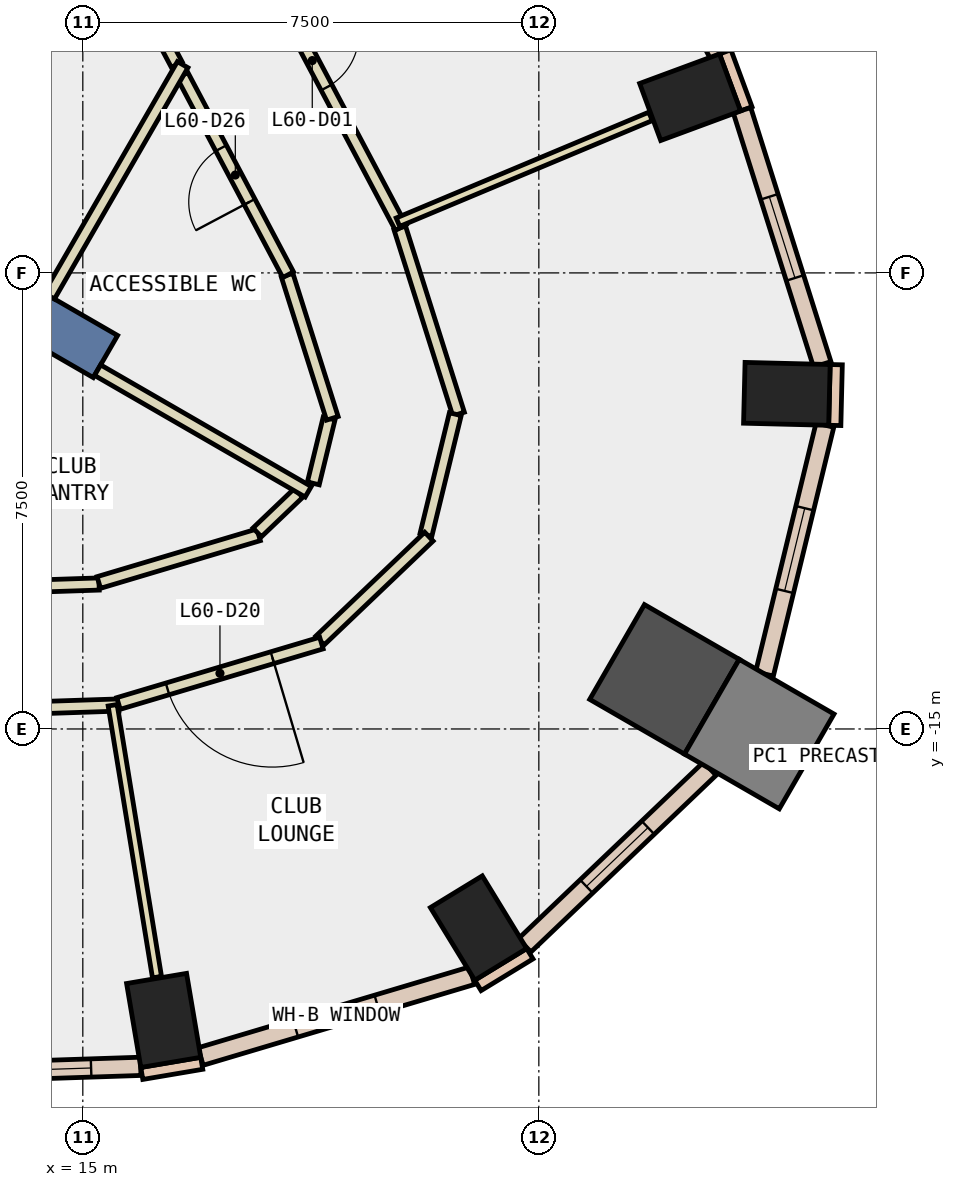
"""IFC4 building model, lengths in metres.
Left out: names, types, materials, properties, quantities, classifications, styles, units other than length and angle.
Written with IfcOpenShell. Run it as: python <this file> out.ifc"""

import sys

from ifc_helpers import new_model, si_unit, direction, frame, frame_2d, origin, origin_2d, place, context, subcontext, project, spatial, rectangle, extrude, element, fill, save


model = new_model("IFC4")
c1 = context("Model", 3, precision=1e-05, world=origin(), true_north=direction((0.0, 1.0)))
c2 = subcontext(c1, "Body", "Model", "MODEL_VIEW")
j1 = project(units=[si_unit("LENGTHUNIT", "METRE"), si_unit("PLANEANGLEUNIT", "RADIAN")], contexts=[c1])
p1 = place(None, origin())
s1 = spatial("IfcSite", under=j1, at=p1, CompositionType="ELEMENT")
p2 = place(p1, origin())
s2 = spatial("IfcBuilding", under=s1, at=p2, CompositionType="ELEMENT")
p3 = place(p2, frame((0.0, 0.0, 263.0)))
s3 = spatial("IfcBuildingStorey", under=s2, at=p3, CompositionType="ELEMENT", Elevation=263.0)
for number, where, z_axis, x_axis in (
    (1, (16.33, -19.793, -0.34), (0.0, 0.0, 1.0), (0.986, 0.167, 0.0)),
    (2, (21.508, -18.274, -0.34), (0.0, 0.0, 1.0), (0.853, 0.521, 0.0)),
):
    element("IfcColumn", number, at=place(p3, frame(where, z_axis=z_axis, x_axis=x_axis)), inside=s3, PredefinedType="COLUMN", context=c2, shape_type="SweptSolid", body=[
        extrude(rectangle(XDim=1.0, YDim=1.4, at=origin_2d()), origin(), (0.0, 0.0, 1.0), 3.6),
    ])
p4 = place(p3, frame((24.566, -14.184, -0.34), z_axis=(0.0, 0.0, 1.0), x_axis=(-0.866025403784, 0.5, 0.0)))
e3 = element("IfcColumn", 3, at=p4, inside=s3, PredefinedType="COLUMN", context=c2, shape_type="SweptSolid", body=[
    extrude(rectangle(XDim=1.8, YDim=1.8, at=origin_2d()), origin(), (0.0, 0.0, 1.0), 3.6),
])
for number, where, z_axis, x_axis in (
    (4, (26.579, -9.489, -0.34), (0.0, 0.0, 1.0), (0.025, 1.0, 0.0)),
    (5, (24.988, -4.611, -0.34), (0.0, 0.0, 1.0), (-0.347, 0.938, 0.0)),
):
    element("IfcColumn", number, at=place(p3, frame(where, z_axis=z_axis, x_axis=x_axis)), inside=s3, PredefinedType="COLUMN", context=c2, shape_type="SweptSolid", body=[
        extrude(rectangle(XDim=1.0, YDim=1.4, at=origin_2d()), origin(), (0.0, 0.0, 1.0), 3.6),
    ])
p5 = place(p3, frame((26.125, -15.084, -0.34), z_axis=(0.0, 0.0, 1.0), x_axis=(-0.866025403784, 0.5, 0.0)))
e6 = element("IfcColumn", 6, at=p5, inside=s3, PredefinedType="COLUMN", context=c2, shape_type="SweptSolid", body=[
    extrude(rectangle(XDim=1.8, YDim=1.8, at=origin_2d()), origin(), (0.0, 0.0, 1.0), 3.6),
])
p6 = place(p3, frame((7.578, -4.375, -0.34), z_axis=(0.0, 0.0, 1.0), x_axis=(0.866024315419, -0.5000018851, 0.0)))
e7 = element("IfcWall", 7, at=p6, inside=s3, PredefinedType="SHEAR", context=c2, shape_type="SweptSolid", body=[
    extrude(rectangle(XDim=9.0, YDim=0.8, at=frame_2d((4.5, 0.0))), origin(), (0.0, 0.0, 1.0), 3.6),
])
for number, where, z_axis, x_axis in (
    (8, (25.912, -4.803, 0.0), (0.0, 0.0, 1.0), (-0.347, 0.938, 0.0)),
    (9, (15.97, -20.665, 0.0), (0.0, 0.0, 1.0), (0.986, 0.167, 0.0)),
):
    element("IfcWall", number, at=place(p3, frame(where, z_axis=z_axis, x_axis=x_axis)), inside=s3, PredefinedType="STANDARD", context=c2, shape_type="SweptSolid", body=[
        extrude(rectangle(XDim=1.0, YDim=0.2, at=frame_2d((0.5, 0.0))), origin(), (0.0, 0.0, 1.0), 3.26),
    ])
p7 = place(p3, frame((21.498, -19.217, 0.0), z_axis=(0.0, 0.0, 1.0), x_axis=(0.853679739553, 0.520798331677, 0.0)))
e10 = element("IfcWall", 10, at=p7, inside=s3, PredefinedType="STANDARD", context=c2, shape_type="SweptSolid", body=[
    extrude(rectangle(XDim=1.0, YDim=0.2, at=frame_2d((0.5, 0.0))), origin(), (0.0, 0.0, 1.0), 3.26),
])
p8 = place(p3, frame((27.367, -10.008, 0.0), z_axis=(0.0, 0.0, 1.0), x_axis=(0.024186470916, 0.999707464524, 0.0)))
e11 = element("IfcWall", 11, at=p8, inside=s3, PredefinedType="STANDARD", context=c2, shape_type="SweptSolid", body=[
    extrude(rectangle(XDim=0.999, YDim=0.2, at=frame_2d((0.5, 0.0))), origin(), (0.0, 0.0, 1.0), 3.26),
])
p9 = place(p3, frame((8.296, -20.802, 0.0), z_axis=(0.0, 0.0, 1.0), x_axis=(0.999450376985, 0.033150323459, 0.0)))
e12 = element("IfcWall", 12, at=p9, inside=s3, PredefinedType="STANDARD", context=c2, shape_type="SweptSolid", body=[
    extrude(rectangle(XDim=7.659, YDim=0.3, at=frame_2d((3.83, 0.0))), origin(), (0.0, 0.0, 1.0), 3.26),
])
p10 = place(p9, frame((0.815, 0.0, 0.9)))
e13 = element("IfcOpeningElement", 13, at=p10, cuts=e12, PredefinedType="OPENING", context=c2, shape_type="SweptSolid", body=[
    extrude(rectangle(XDim=2.2, YDim=2.0, at=frame_2d((1.1, 1.0))), frame((0.0, 0.16, 0.0), z_axis=(0.0, -1.0, 0.0), x_axis=(1.0, 0.0, 0.0)), (0.0, 0.0, 1.0), 0.32),
])
p11 = place(p9, frame((4.644, 0.0, 0.9)))
e14 = element("IfcOpeningElement", 14, at=p11, cuts=e12, PredefinedType="OPENING", context=c2, shape_type="SweptSolid", body=[
    extrude(rectangle(XDim=2.2, YDim=2.0, at=frame_2d((1.1, 1.0))), frame((0.0, 0.16, 0.0), z_axis=(0.0, -1.0, 0.0), x_axis=(1.0, 0.0, 0.0)), (0.0, 0.0, 1.0), 0.32),
])
p12 = place(p3, frame((16.937, -20.387, 0.0), z_axis=(0.0, 0.0, 1.0), x_axis=(0.958361270465, 0.285558532131, 0.0)))
e15 = element("IfcWall", 15, at=p12, inside=s3, PredefinedType="STANDARD", context=c2, shape_type="SweptSolid", body=[
    extrude(rectangle(XDim=4.658, YDim=0.3, at=frame_2d((2.329, 0.0))), origin(), (0.0, 0.0, 1.0), 3.26),
])
p13 = place(p12, frame((1.629, 0.0, 0.9)))
e16 = element("IfcOpeningElement", 16, at=p13, cuts=e15, PredefinedType="OPENING", context=c2, shape_type="SweptSolid", body=[
    extrude(rectangle(XDim=1.4, YDim=2.0, at=frame_2d((0.7, 1.0))), frame((0.0, 0.16, 0.0), z_axis=(0.0, -1.0, 0.0), x_axis=(1.0, 0.0, 0.0)), (0.0, 0.0, 1.0), 0.32),
])
p14 = place(p3, frame((22.266, -18.559, 0.0), z_axis=(0.0, 0.0, 1.0), x_axis=(0.723526681061, 0.690296415892, 0.0)))
e17 = element("IfcWall", 17, at=p14, inside=s3, PredefinedType="STANDARD", context=c2, shape_type="SweptSolid", body=[
    extrude(rectangle(XDim=4.21, YDim=0.3, at=frame_2d((2.105, 0.0))), origin(), (0.0, 0.0, 1.0), 3.26),
])
p15 = place(p14, frame((1.405, 0.0, 0.9)))
e18 = element("IfcOpeningElement", 18, at=p15, cuts=e17, PredefinedType="OPENING", context=c2, shape_type="SweptSolid", body=[
    extrude(rectangle(XDim=1.4, YDim=2.0, at=frame_2d((0.7, 1.0))), frame((0.0, 0.16, 0.0), z_axis=(0.0, -1.0, 0.0), x_axis=(1.0, 0.0, 0.0)), (0.0, 0.0, 1.0), 0.32),
])
p16 = place(p3, frame((26.211, -14.095, 0.0), z_axis=(0.0, 0.0, 1.0), x_axis=(0.236077883519, 0.97173413695, 0.0)))
e19 = element("IfcWall", 19, at=p16, inside=s3, PredefinedType="STANDARD", context=c2, shape_type="SweptSolid", body=[
    extrude(rectangle(XDim=4.211, YDim=0.3, at=frame_2d((2.105, 0.0))), origin(), (0.0, 0.0, 1.0), 3.26),
])
p17 = place(p16, frame((1.405, 0.0, 0.9)))
e20 = element("IfcOpeningElement", 20, at=p17, cuts=e19, PredefinedType="OPENING", context=c2, shape_type="SweptSolid", body=[
    extrude(rectangle(XDim=1.4, YDim=2.0, at=frame_2d((0.7, 1.0))), frame((0.0, 0.16, 0.0), z_axis=(0.0, -1.0, 0.0), x_axis=(1.0, 0.0, 0.0)), (0.0, 0.0, 1.0), 0.32),
])
p18 = place(p3, frame((27.161, -9.004, 0.0), z_axis=(0.0, 0.0, 1.0), x_axis=(-0.30108868778, 0.953596142028, 0.0)))
e21 = element("IfcWall", 21, at=p18, inside=s3, PredefinedType="STANDARD", context=c2, shape_type="SweptSolid", body=[
    extrude(rectangle(XDim=4.38, YDim=0.3, at=frame_2d((2.19, 0.0))), origin(), (0.0, 0.0, 1.0), 3.26),
])
p19 = place(p18, frame((1.49, 0.0, 0.9)))
e22 = element("IfcOpeningElement", 22, at=p19, cuts=e21, PredefinedType="OPENING", context=c2, shape_type="SweptSolid", body=[
    extrude(rectangle(XDim=1.4, YDim=2.0, at=frame_2d((0.7, 1.0))), frame((0.0, 0.16, 0.0), z_axis=(0.0, -1.0, 0.0), x_axis=(1.0, 0.0, 0.0)), (0.0, 0.0, 1.0), 0.32),
])
p20 = place(p3, frame((25.454, -3.907, 0.0), z_axis=(0.0, 0.0, 1.0), x_axis=(-0.468220106253, 0.883611867338, 0.0)))
e23 = element("IfcWall", 23, at=p20, inside=s3, PredefinedType="STANDARD", context=c2, shape_type="SweptSolid", body=[
    extrude(rectangle(XDim=5.703, YDim=0.3, at=frame_2d((2.852, 0.0))), origin(), (0.0, 0.0, 1.0), 3.26),
])
p21 = place(p20, frame((0.476, 0.0, 0.9)))
e24 = element("IfcOpeningElement", 24, at=p21, cuts=e23, PredefinedType="OPENING", context=c2, shape_type="SweptSolid", body=[
    extrude(rectangle(XDim=1.9, YDim=2.0, at=frame_2d((0.95, 1.0))), frame((0.0, 0.16, 0.0), z_axis=(0.0, -1.0, 0.0), x_axis=(1.0, 0.0, 0.0)), (0.0, 0.0, 1.0), 0.32),
])
p22 = place(p20, frame((3.327, 0.0, 0.9)))
e25 = element("IfcOpeningElement", 25, at=p22, cuts=e23, PredefinedType="OPENING", context=c2, shape_type="SweptSolid", body=[
    extrude(rectangle(XDim=1.9, YDim=2.0, at=frame_2d((0.95, 1.0))), frame((0.0, 0.16, 0.0), z_axis=(0.0, -1.0, 0.0), x_axis=(1.0, 0.0, 0.0)), (0.0, 0.0, 1.0), 0.32),
])
p23 = place(p3, frame((16.545, -4.074, 0.0), z_axis=(0.0, 0.0, 1.0), x_axis=(-0.468321873419, 0.883557934081, 0.0)))
e26 = element("IfcWall", 26, at=p23, inside=s3, PredefinedType="PARTITIONING", context=c2, shape_type="SweptSolid", body=[
    extrude(rectangle(XDim=2.093, YDim=0.2, at=frame_2d((1.046, 0.0))), origin(), (0.0, 0.0, 1.0), 3.26),
])
p24 = place(p3, frame((11.716, -12.734, 0.0), z_axis=(0.0, 0.0, 1.0), x_axis=(0.999449093602, 0.03318899362, 0.0)))
e27 = element("IfcWall", 27, at=p24, inside=s3, PredefinedType="PARTITIONING", context=c2, shape_type="SweptSolid", body=[
    extrude(rectangle(XDim=3.553, YDim=0.2, at=frame_2d((1.776, 0.0))), origin(), (0.0, 0.0, 1.0), 3.26),
])
p25 = place(p24, frame((1.276, 0.0, 0.0)))
e28 = element("IfcOpeningElement", 28, at=p25, cuts=e27, PredefinedType="OPENING", context=c2, shape_type="SweptSolid", body=[
    extrude(rectangle(XDim=1.0, YDim=2.1, at=frame_2d((0.5, 1.05))), frame((0.0, 0.11, 0.0), z_axis=(0.0, -1.0, 0.0), x_axis=(1.0, 0.0, 0.0)), (0.0, 0.0, 1.0), 0.22),
])
p26 = place(p3, frame((15.263, -12.591, 0.0), z_axis=(0.0, 0.0, 1.0), x_axis=(0.958253964342, 0.285918414628, 0.0)))
e29 = element("IfcWall", 29, at=p26, inside=s3, PredefinedType="PARTITIONING", context=c2, shape_type="SweptSolid", body=[
    extrude(rectangle(XDim=2.743, YDim=0.2, at=frame_2d((1.371, 0.0))), origin(), (0.0, 0.0, 1.0), 3.26),
])
p27 = place(p3, frame((17.868, -11.767, 0.0), z_axis=(0.0, 0.0, 1.0), x_axis=(0.723402701671, 0.690426340181, 0.0)))
e30 = element("IfcWall", 30, at=p27, inside=s3, PredefinedType="PARTITIONING", context=c2, shape_type="SweptSolid", body=[
    extrude(rectangle(XDim=0.94, YDim=0.2, at=frame_2d((0.47, 0.0))), origin(), (0.0, 0.0, 1.0), 3.26),
])
p28 = place(p3, frame((18.791, -10.961, 0.0), z_axis=(0.0, 0.0, 1.0), x_axis=(0.236572634589, 0.971613806285, 0.0)))
e31 = element("IfcWall", 31, at=p28, inside=s3, PredefinedType="PARTITIONING", context=c2, shape_type="SweptSolid", body=[
    extrude(rectangle(XDim=1.099, YDim=0.2, at=frame_2d((0.55, 0.0))), origin(), (0.0, 0.0, 1.0), 3.26),
])
p29 = place(p3, frame((19.104, -9.891, 0.0), z_axis=(0.0, 0.0, 1.0), x_axis=(-0.301325410186, 0.953521366922, 0.0)))
e32 = element("IfcWall", 32, at=p29, inside=s3, PredefinedType="PARTITIONING", context=c2, shape_type="SweptSolid", body=[
    extrude(rectangle(XDim=2.469, YDim=0.2, at=frame_2d((1.234, 0.0))), origin(), (0.0, 0.0, 1.0), 3.26),
])
p30 = place(p3, frame((18.377, -7.53, 0.0), z_axis=(0.0, 0.0, 1.0), x_axis=(-0.468214048123, 0.883615077474, 0.0)))
e33 = element("IfcWall", 33, at=p30, inside=s3, PredefinedType="PARTITIONING", context=c2, shape_type="SweptSolid", body=[
    extrude(rectangle(XDim=3.712, YDim=0.2, at=frame_2d((1.856, 0.0))), origin(), (0.0, 0.0, 1.0), 3.26),
])
p31 = place(p30, frame((1.356, 0.0, 0.0)))
e34 = element("IfcOpeningElement", 34, at=p31, cuts=e33, PredefinedType="OPENING", context=c2, shape_type="SweptSolid", body=[
    extrude(rectangle(XDim=1.0, YDim=2.1, at=frame_2d((0.5, 1.05))), frame((0.0, 0.11, 0.0), z_axis=(0.0, -1.0, 0.0), x_axis=(1.0, 0.0, 0.0)), (0.0, 0.0, 1.0), 0.22),
])
p32 = place(p3, frame((15.591, -14.606, 0.0), z_axis=(0.0, 0.0, 1.0), x_axis=(-0.999445318732, -0.03330247535, 0.0)))
e35 = element("IfcWall", 35, at=p32, inside=s3, PredefinedType="PARTITIONING", context=c2, shape_type="SweptSolid", body=[
    extrude(rectangle(XDim=7.896, YDim=0.2, at=frame_2d((3.948, 0.0))), origin(), (0.0, 0.0, 1.0), 3.26),
])
p33 = place(p32, frame((3.498, 0.0, 0.0)))
e36 = element("IfcOpeningElement", 36, at=p33, cuts=e35, PredefinedType="OPENING", context=c2, shape_type="SweptSolid", body=[
    extrude(rectangle(XDim=0.9, YDim=2.1, at=frame_2d((0.45, 1.05))), frame((0.0, 0.11, 0.0), z_axis=(0.0, -1.0, 0.0), x_axis=(1.0, 0.0, 0.0)), (0.0, 0.0, 1.0), 0.22),
])
p34 = place(p3, frame((20.213, -6.761, 0.0), z_axis=(0.0, 0.0, 1.0), x_axis=(0.301331608119, -0.953519408271, 0.0)))
e37 = element("IfcWall", 37, at=p34, inside=s3, PredefinedType="PARTITIONING", context=c2, shape_type="SweptSolid", body=[
    extrude(rectangle(XDim=3.209, YDim=0.2, at=frame_2d((1.604, 0.0))), origin(), (0.0, 0.0, 1.0), 3.26),
])
p35 = place(p3, frame((21.126, -9.823, 0.0), z_axis=(0.0, 0.0, 1.0), x_axis=(-0.236372924437, -0.971662410816, 0.0)))
e38 = element("IfcWall", 38, at=p35, inside=s3, PredefinedType="PARTITIONING", context=c2, shape_type="SweptSolid", body=[
    extrude(rectangle(XDim=2.043, YDim=0.2, at=frame_2d((1.021, 0.0))), origin(), (0.0, 0.0, 1.0), 3.26),
])
p36 = place(p3, frame((20.692, -11.837, 0.0), z_axis=(0.0, 0.0, 1.0), x_axis=(-0.723668833869, -0.690147389248, 0.0)))
e39 = element("IfcWall", 39, at=p36, inside=s3, PredefinedType="PARTITIONING", context=c2, shape_type="SweptSolid", body=[
    extrude(rectangle(XDim=2.476, YDim=0.2, at=frame_2d((1.238, 0.0))), origin(), (0.0, 0.0, 1.0), 3.26),
])
p37 = place(p3, frame((18.924, -13.587, 0.0), z_axis=(0.0, 0.0, 1.0), x_axis=(-0.958378336681, -0.285501250052, 0.0)))
e40 = element("IfcWall", 40, at=p37, inside=s3, PredefinedType="PARTITIONING", context=c2, shape_type="SweptSolid", body=[
    extrude(rectangle(XDim=3.482, YDim=0.2, at=frame_2d((1.741, 0.0))), origin(), (0.0, 0.0, 1.0), 3.26),
])
p38 = place(p37, frame((0.841, 0.0, 0.0)))
e41 = element("IfcOpeningElement", 41, at=p38, cuts=e40, PredefinedType="OPENING", context=c2, shape_type="SweptSolid", body=[
    extrude(rectangle(XDim=1.8, YDim=2.1, at=frame_2d((0.9, 1.05))), frame((0.0, 0.11, 0.0), z_axis=(0.0, -1.0, 0.0), x_axis=(1.0, 0.0, 0.0)), (0.0, 0.0, 1.0), 0.22),
])
p39 = place(p3, frame((17.318, -1.262, 0.0), z_axis=(0.0, 0.0, 1.0), x_axis=(0.468313568794, -0.883562335822, 0.0)))
e42 = element("IfcWall", 42, at=p39, inside=s3, PredefinedType="PARTITIONING", context=c2, shape_type="SweptSolid", body=[
    extrude(rectangle(XDim=6.216, YDim=0.2, at=frame_2d((3.108, 0.0))), origin(), (0.0, 0.0, 1.0), 3.26),
])
p40 = place(p39, frame((2.608, 0.0, 0.0)))
e43 = element("IfcOpeningElement", 43, at=p40, cuts=e42, PredefinedType="OPENING", context=c2, shape_type="SweptSolid", body=[
    extrude(rectangle(XDim=1.0, YDim=2.1, at=frame_2d((0.5, 1.05))), frame((0.0, 0.11, 0.0), z_axis=(0.0, -1.0, 0.0), x_axis=(1.0, 0.0, 0.0)), (0.0, 0.0, 1.0), 0.22),
])
p41 = place(p3, frame((16.642, -4.075, 0.0), z_axis=(0.0, 0.0, 1.0), x_axis=(-0.49980426207, -0.866138383641, 0.0)))
e44 = element("IfcWall", 44, at=p41, inside=s3, PredefinedType="PARTITIONING", context=c2, shape_type="SweptSolid", body=[
    extrude(rectangle(XDim=4.392, YDim=0.2, at=frame_2d((2.196, 0.0))), origin(), (0.0, 0.0, 1.0), 3.26),
])
p42 = place(p3, frame((15.243, -9.099, 0.0), z_axis=(0.0, 0.0, 1.0), x_axis=(0.866026010844, -0.49999894854, 0.0)))
e45 = element("IfcWall", 45, at=p42, inside=s3, PredefinedType="PARTITIONING", context=c2, shape_type="SweptSolid", body=[
    extrude(rectangle(XDim=4.0, YDim=0.2, at=frame_2d((2.0, 0.0))), origin(), (0.0, 0.0, 1.0), 3.26),
])
p43 = place(p3, frame((15.491, -14.61, 0.0), z_axis=(0.0, 0.0, 1.0), x_axis=(0.160928343418, -0.986966092774, 0.0)))
e46 = element("IfcWall", 46, at=p43, inside=s3, PredefinedType="PARTITIONING", context=c2, shape_type="SweptSolid", body=[
    extrude(rectangle(XDim=4.53, YDim=0.15, at=frame_2d((2.265, 0.0))), origin(), (0.0, 0.0, 1.0), 3.26),
])
p44 = place(p3, frame((20.183, -6.666, 0.0), z_axis=(0.0, 0.0, 1.0), x_axis=(0.922347108299, 0.386362280525, 0.0)))
e47 = element("IfcWall", 47, at=p44, inside=s3, PredefinedType="PARTITIONING", context=c2, shape_type="SweptSolid", body=[
    extrude(rectangle(XDim=4.503, YDim=0.15, at=frame_2d((2.252, 0.0))), origin(), (0.0, 0.0, 1.0), 3.26),
])
p45 = place(p11, origin())
e48 = element("IfcWindow", 48, at=p45, inside=s3, PartitioningType="SINGLE_PANEL", PredefinedType="WINDOW", context=c2, shape_type="SweptSolid", body=[
    extrude(rectangle(XDim=2.2, YDim=2.0, at=frame_2d((1.1, 1.0))), frame((0.0, 0.03, 0.0), z_axis=(0.0, -1.0, 0.0), x_axis=(1.0, 0.0, 0.0)), (0.0, 0.0, 1.0), 0.06),
])
fill(e14, e48)
p46 = place(p13, origin())
e49 = element("IfcWindow", 49, at=p46, inside=s3, PartitioningType="SINGLE_PANEL", PredefinedType="WINDOW", context=c2, shape_type="SweptSolid", body=[
    extrude(rectangle(XDim=1.4, YDim=2.0, at=frame_2d((0.7, 1.0))), frame((0.0, 0.03, 0.0), z_axis=(0.0, -1.0, 0.0), x_axis=(1.0, 0.0, 0.0)), (0.0, 0.0, 1.0), 0.06),
])
fill(e16, e49)
p47 = place(p15, origin())
e50 = element("IfcWindow", 50, at=p47, inside=s3, PartitioningType="SINGLE_PANEL", PredefinedType="WINDOW", context=c2, shape_type="SweptSolid", body=[
    extrude(rectangle(XDim=1.4, YDim=2.0, at=frame_2d((0.7, 1.0))), frame((0.0, 0.03, 0.0), z_axis=(0.0, -1.0, 0.0), x_axis=(1.0, 0.0, 0.0)), (0.0, 0.0, 1.0), 0.06),
])
fill(e18, e50)
p48 = place(p17, origin())
e51 = element("IfcWindow", 51, at=p48, inside=s3, PartitioningType="SINGLE_PANEL", PredefinedType="WINDOW", context=c2, shape_type="SweptSolid", body=[
    extrude(rectangle(XDim=1.4, YDim=2.0, at=frame_2d((0.7, 1.0))), frame((0.0, 0.03, 0.0), z_axis=(0.0, -1.0, 0.0), x_axis=(1.0, 0.0, 0.0)), (0.0, 0.0, 1.0), 0.06),
])
fill(e20, e51)
p49 = place(p19, origin())
e52 = element("IfcWindow", 52, at=p49, inside=s3, PartitioningType="SINGLE_PANEL", PredefinedType="WINDOW", context=c2, shape_type="SweptSolid", body=[
    extrude(rectangle(XDim=1.4, YDim=2.0, at=frame_2d((0.7, 1.0))), frame((0.0, 0.03, 0.0), z_axis=(0.0, -1.0, 0.0), x_axis=(1.0, 0.0, 0.0)), (0.0, 0.0, 1.0), 0.06),
])
fill(e22, e52)
p50 = place(p40, origin())
e53 = element("IfcDoor", 53, at=p50, inside=s3, OperationType="SINGLE_SWING_LEFT", PredefinedType="DOOR", context=c2, shape_type="SweptSolid", body=[
    extrude(rectangle(XDim=1.0, YDim=2.1, at=frame_2d((0.5, 1.05))), frame((0.0, 0.025, 0.0), z_axis=(0.0, -1.0, 0.0), x_axis=(1.0, 0.0, 0.0)), (0.0, 0.0, 1.0), 0.05),
])
fill(e43, e53)
p51 = place(p38, origin())
e54 = element("IfcDoor", 54, at=p51, inside=s3, OperationType="DOUBLE_DOOR_SINGLE_SWING", PredefinedType="DOOR", context=c2, shape_type="SweptSolid", body=[
    extrude(rectangle(XDim=1.8, YDim=2.1, at=frame_2d((0.9, 1.05))), frame((0.0, 0.025, 0.0), z_axis=(0.0, -1.0, 0.0), x_axis=(1.0, 0.0, 0.0)), (0.0, 0.0, 1.0), 0.05),
])
fill(e41, e54)
p52 = place(p31, origin())
e55 = element("IfcDoor", 55, at=p52, inside=s3, OperationType="SINGLE_SWING_RIGHT", PredefinedType="DOOR", context=c2, shape_type="SweptSolid", body=[
    extrude(rectangle(XDim=1.0, YDim=2.1, at=frame_2d((0.5, 1.05))), frame((0.0, 0.025, 0.0), z_axis=(0.0, -1.0, 0.0), x_axis=(1.0, 0.0, 0.0)), (0.0, 0.0, 1.0), 0.05),
])
fill(e34, e55)
save(model, sys.argv[1])
